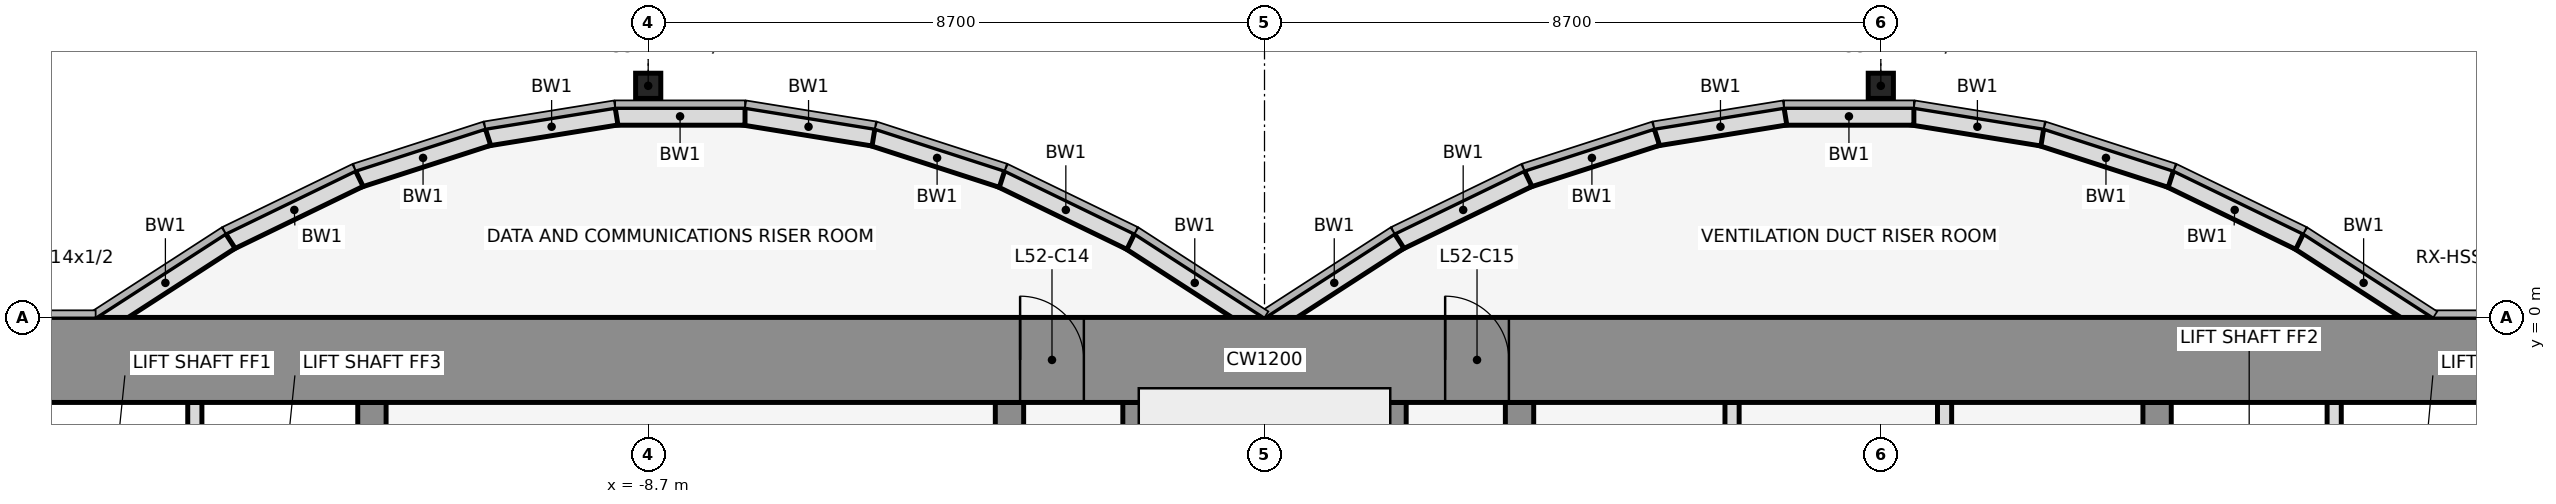
"""IFC4 building model, lengths in metres.
Left out: names, types, materials, properties, quantities, classifications, styles, units other than length and angle.
Written with IfcOpenShell. Run it as: python <this file> out.ifc"""

import sys

from ifc_helpers import new_model, si_unit, direction, frame, frame_2d, origin, origin_2d, place, context, subcontext, project, spatial, rectangle, hollow_rectangle, extrude, element, fill, save


model = new_model("IFC4")
c1 = context("Model", 3, precision=1e-05, world=origin(), true_north=direction((0.0, 1.0)))
c2 = subcontext(c1, "Body", "Model", "MODEL_VIEW")
j1 = project(units=[si_unit("LENGTHUNIT", "METRE"), si_unit("PLANEANGLEUNIT", "RADIAN")], contexts=[c1])
p1 = place(None, origin())
s1 = spatial("IfcSite", under=j1, at=p1, CompositionType="ELEMENT")
p2 = place(p1, origin())
s2 = spatial("IfcBuilding", under=s1, at=p2, CompositionType="ELEMENT")
p3 = place(p2, frame((0.0, 0.0, 231.9)))
s3 = spatial("IfcBuildingStorey", under=s2, at=p3, CompositionType="ELEMENT", Elevation=231.9)
for number, where, z_axis, x_axis in (
    (1, (-8.7, 3.269, 0.0), (0.0, 0.0, 1.0), (1.0, 0.0, 0.0)),
    (2, (8.7, 3.269, 0.0), (0.0, 0.0, 1.0), (1.0, 0.0, 0.0)),
):
    element("IfcColumn", number, at=place(p3, frame(where, z_axis=z_axis, x_axis=x_axis)), inside=s3, PredefinedType="COLUMN", context=c2, shape_type="SweptSolid", body=[
        extrude(hollow_rectangle(XDim=0.356, YDim=0.356, WallThickness=0.012, at=origin_2d()), origin(), (0.0, 0.0, 1.0), 4.1),
    ])
p4 = place(p3, frame((16.432, -0.105, 0.0), z_axis=(0.0, 0.0, 1.0), x_axis=(-0.83981312244, 0.542875602121, 0.0)))
e3 = element("IfcWall", 3, at=p4, inside=s3, PredefinedType="STANDARD", context=c2, shape_type="SweptSolid", body=[
    extrude(rectangle(XDim=2.183, YDim=0.25, at=frame_2d((1.091, 0.0))), origin(), (0.0, 0.0, 1.0), 3.9),
])
p5 = place(p3, frame((14.612, 1.073, 0.0), z_axis=(0.0, 0.0, 1.0), x_axis=(-0.89982408427, 0.436252928206, 0.0)))
e4 = element("IfcWall", 4, at=p5, inside=s3, PredefinedType="STANDARD", context=c2, shape_type="SweptSolid", body=[
    extrude(rectangle(XDim=2.038, YDim=0.25, at=frame_2d((1.019, 0.0))), origin(), (0.0, 0.0, 1.0), 3.9),
])
p6 = place(p3, frame((12.795, 1.955, 0.0), z_axis=(0.0, 0.0, 1.0), x_axis=(-0.951495806175, 0.307661714928, 0.0)))
e5 = element("IfcWall", 5, at=p6, inside=s3, PredefinedType="STANDARD", context=c2, shape_type="SweptSolid", body=[
    extrude(rectangle(XDim=1.927, YDim=0.25, at=frame_2d((0.963, 0.0))), origin(), (0.0, 0.0, 1.0), 3.9),
])
p7 = place(p3, frame((10.98, 2.543, 0.0), z_axis=(0.0, 0.0, 1.0), x_axis=(-0.987181718931, 0.159600293885, 0.0)))
e6 = element("IfcWall", 6, at=p7, inside=s3, PredefinedType="STANDARD", context=c2, shape_type="SweptSolid", body=[
    extrude(rectangle(XDim=1.857, YDim=0.25, at=frame_2d((0.929, 0.0))), origin(), (0.0, 0.0, 1.0), 3.9),
])
p8 = place(p3, frame((9.167, 2.838, 0.0), z_axis=(0.0, 0.0, 1.0), x_axis=(-1.0, 0.0, 0.0)))
e7 = element("IfcWall", 7, at=p8, inside=s3, PredefinedType="STANDARD", context=c2, shape_type="SweptSolid", body=[
    extrude(rectangle(XDim=1.833, YDim=0.25, at=frame_2d((0.917, 0.0))), origin(), (0.0, 0.0, 1.0), 3.9),
])
p9 = place(p3, frame((7.353, 2.84, 0.0), z_axis=(0.0, 0.0, 1.0), x_axis=(-0.987181718931, -0.159600293885, 0.0)))
e8 = element("IfcWall", 8, at=p9, inside=s3, PredefinedType="STANDARD", context=c2, shape_type="SweptSolid", body=[
    extrude(rectangle(XDim=1.857, YDim=0.25, at=frame_2d((0.929, 0.0))), origin(), (0.0, 0.0, 1.0), 3.9),
])
p10 = place(p3, frame((5.538, 2.548, 0.0), z_axis=(0.0, 0.0, 1.0), x_axis=(-0.951495806175, -0.307661714928, 0.0)))
e9 = element("IfcWall", 9, at=p10, inside=s3, PredefinedType="STANDARD", context=c2, shape_type="SweptSolid", body=[
    extrude(rectangle(XDim=1.927, YDim=0.25, at=frame_2d((0.963, 0.0))), origin(), (0.0, 0.0, 1.0), 3.9),
])
p11 = place(p3, frame((3.721, 1.962, 0.0), z_axis=(0.0, 0.0, 1.0), x_axis=(-0.89982408427, -0.436252928206, 0.0)))
e10 = element("IfcWall", 10, at=p11, inside=s3, PredefinedType="STANDARD", context=c2, shape_type="SweptSolid", body=[
    extrude(rectangle(XDim=2.038, YDim=0.25, at=frame_2d((1.019, 0.0))), origin(), (0.0, 0.0, 1.0), 3.9),
])
for number, where, z_axis, x_axis in (
    (11, (1.901, 1.08, 0.0), (0.0, 0.0, 1.0), (-0.84, -0.543, 0.0)),
    (12, (-0.068, -0.105, 0.0), (0.0, 0.0, 1.0), (-0.84, 0.543, 0.0)),
):
    element("IfcWall", number, at=place(p3, frame(where, z_axis=z_axis, x_axis=x_axis)), inside=s3, PredefinedType="STANDARD", context=c2, shape_type="SweptSolid", body=[
        extrude(rectangle(XDim=2.183, YDim=0.25, at=frame_2d((1.091, 0.0))), origin(), (0.0, 0.0, 1.0), 3.9),
    ])
p12 = place(p3, frame((-1.888, 1.073, 0.0), z_axis=(0.0, 0.0, 1.0), x_axis=(-0.89982408427, 0.436252928206, 0.0)))
e13 = element("IfcWall", 13, at=p12, inside=s3, PredefinedType="STANDARD", context=c2, shape_type="SweptSolid", body=[
    extrude(rectangle(XDim=2.038, YDim=0.25, at=frame_2d((1.019, 0.0))), origin(), (0.0, 0.0, 1.0), 3.9),
])
p13 = place(p3, frame((-3.705, 1.955, 0.0), z_axis=(0.0, 0.0, 1.0), x_axis=(-0.951495806175, 0.307661714928, 0.0)))
e14 = element("IfcWall", 14, at=p13, inside=s3, PredefinedType="STANDARD", context=c2, shape_type="SweptSolid", body=[
    extrude(rectangle(XDim=1.927, YDim=0.25, at=frame_2d((0.963, 0.0))), origin(), (0.0, 0.0, 1.0), 3.9),
])
p14 = place(p3, frame((-5.52, 2.543, 0.0), z_axis=(0.0, 0.0, 1.0), x_axis=(-0.987181718931, 0.159600293885, 0.0)))
e15 = element("IfcWall", 15, at=p14, inside=s3, PredefinedType="STANDARD", context=c2, shape_type="SweptSolid", body=[
    extrude(rectangle(XDim=1.857, YDim=0.25, at=frame_2d((0.929, 0.0))), origin(), (0.0, 0.0, 1.0), 3.9),
])
p15 = place(p3, frame((-7.333, 2.838, 0.0), z_axis=(0.0, 0.0, 1.0), x_axis=(-1.0, 0.0, 0.0)))
e16 = element("IfcWall", 16, at=p15, inside=s3, PredefinedType="STANDARD", context=c2, shape_type="SweptSolid", body=[
    extrude(rectangle(XDim=1.833, YDim=0.25, at=frame_2d((0.917, 0.0))), origin(), (0.0, 0.0, 1.0), 3.9),
])
p16 = place(p3, frame((-9.147, 2.84, 0.0), z_axis=(0.0, 0.0, 1.0), x_axis=(-0.987181718931, -0.159600293885, 0.0)))
e17 = element("IfcWall", 17, at=p16, inside=s3, PredefinedType="STANDARD", context=c2, shape_type="SweptSolid", body=[
    extrude(rectangle(XDim=1.857, YDim=0.25, at=frame_2d((0.929, 0.0))), origin(), (0.0, 0.0, 1.0), 3.9),
])
p17 = place(p3, frame((-10.962, 2.548, 0.0), z_axis=(0.0, 0.0, 1.0), x_axis=(-0.951495806175, -0.307661714928, 0.0)))
e18 = element("IfcWall", 18, at=p17, inside=s3, PredefinedType="STANDARD", context=c2, shape_type="SweptSolid", body=[
    extrude(rectangle(XDim=1.927, YDim=0.25, at=frame_2d((0.963, 0.0))), origin(), (0.0, 0.0, 1.0), 3.9),
])
p18 = place(p3, frame((-12.779, 1.962, 0.0), z_axis=(0.0, 0.0, 1.0), x_axis=(-0.89982408427, -0.436252928206, 0.0)))
e19 = element("IfcWall", 19, at=p18, inside=s3, PredefinedType="STANDARD", context=c2, shape_type="SweptSolid", body=[
    extrude(rectangle(XDim=2.038, YDim=0.25, at=frame_2d((1.019, 0.0))), origin(), (0.0, 0.0, 1.0), 3.9),
])
p19 = place(p3, frame((-14.599, 1.08, 0.0), z_axis=(0.0, 0.0, 1.0), x_axis=(-0.83981312244, -0.542875602121, 0.0)))
e20 = element("IfcWall", 20, at=p19, inside=s3, PredefinedType="STANDARD", context=c2, shape_type="SweptSolid", body=[
    extrude(rectangle(XDim=2.183, YDim=0.25, at=frame_2d((1.091, 0.0))), origin(), (0.0, 0.0, 1.0), 3.9),
])
p20 = place(p3, frame((-15.1, -4.6, 0.0), z_axis=(0.0, 0.0, 1.0), x_axis=(0.0, 1.0, 0.0)))
e21 = element("IfcWall", 21, at=p20, inside=s3, PredefinedType="PARTITIONING", context=c2, shape_type="SweptSolid", body=[
    extrude(rectangle(XDim=3.4, YDim=0.2, at=frame_2d((1.7, 0.0))), origin(), (0.0, 0.0, 1.0), 2.79),
])
p21 = place(p3, frame((-12.6, -11.8, 0.0), z_axis=(0.0, 0.0, 1.0), x_axis=(0.0, 1.0, 0.0)))
e22 = element("IfcWall", 22, at=p21, inside=s3, PredefinedType="SHEAR", context=c2, shape_type="SweptSolid", body=[
    extrude(rectangle(XDim=10.6, YDim=0.4, at=frame_2d((5.3, 0.0))), origin(), (0.0, 0.0, 1.0), 4.1),
])
p22 = place(p21, frame((4.75, 0.0, 0.0)))
e23 = element("IfcOpeningElement", 23, at=p22, cuts=e22, PredefinedType="OPENING", context=c2, shape_type="SweptSolid", body=[
    extrude(rectangle(XDim=1.1, YDim=2.1, at=frame_2d((0.55, 1.05))), frame((0.0, 0.212, 0.0), z_axis=(0.0, -1.0, 0.0), x_axis=(1.0, 0.0, 0.0)), (0.0, 0.0, 1.0), 0.424),
])
p23 = place(p3, frame((-3.6, -11.8, 0.0), z_axis=(0.0, 0.0, 1.0), x_axis=(0.0, 1.0, 0.0)))
e24 = element("IfcWall", 24, at=p23, inside=s3, PredefinedType="SHEAR", context=c2, shape_type="SweptSolid", body=[
    extrude(rectangle(XDim=10.6, YDim=0.4, at=frame_2d((5.3, 0.0))), origin(), (0.0, 0.0, 1.0), 4.1),
])
p24 = place(p23, frame((4.85, 0.0, 0.0)))
e25 = element("IfcOpeningElement", 25, at=p24, cuts=e24, PredefinedType="OPENING", context=c2, shape_type="SweptSolid", body=[
    extrude(rectangle(XDim=0.9, YDim=2.1, at=frame_2d((0.45, 1.05))), frame((0.0, 0.212, 0.0), z_axis=(0.0, -1.0, 0.0), x_axis=(1.0, 0.0, 0.0)), (0.0, 0.0, 1.0), 0.424),
])
for number, where, z_axis, x_axis in (
    (26, (-1.8, -11.8, 0.0), (0.0, 0.0, 1.0), (0.0, 1.0, 0.0)),
    (27, (1.8, -11.8, 0.0), (0.0, 0.0, 1.0), (0.0, 1.0, 0.0)),
):
    element("IfcWall", number, at=place(p3, frame(where, z_axis=z_axis, x_axis=x_axis)), inside=s3, PredefinedType="SHEAR", context=c2, shape_type="SweptSolid", body=[
        extrude(rectangle(XDim=10.6, YDim=0.4, at=frame_2d((5.3, 0.0))), origin(), (0.0, 0.0, 1.0), 4.1),
    ])
p25 = place(p3, frame((3.6, -11.8, 0.0), z_axis=(0.0, 0.0, 1.0), x_axis=(0.0, 1.0, 0.0)))
e28 = element("IfcWall", 28, at=p25, inside=s3, PredefinedType="SHEAR", context=c2, shape_type="SweptSolid", body=[
    extrude(rectangle(XDim=10.6, YDim=0.4, at=frame_2d((5.3, 0.0))), origin(), (0.0, 0.0, 1.0), 4.1),
])
p26 = place(p25, frame((1.35, 0.0, 0.0)))
e29 = element("IfcOpeningElement", 29, at=p26, cuts=e28, PredefinedType="OPENING", context=c2, shape_type="SweptSolid", body=[
    extrude(rectangle(XDim=0.9, YDim=2.1, at=frame_2d((0.45, 1.05))), frame((0.0, 0.212, 0.0), z_axis=(0.0, -1.0, 0.0), x_axis=(1.0, 0.0, 0.0)), (0.0, 0.0, 1.0), 0.424),
])
for number, where, z_axis, x_axis in (
    (30, (6.6, -4.6, 0.0), (0.0, 0.0, 1.0), (0.0, 1.0, 0.0)),
    (31, (9.6, -4.6, 0.0), (0.0, 0.0, 1.0), (0.0, 1.0, 0.0)),
):
    element("IfcWall", number, at=place(p3, frame(where, z_axis=z_axis, x_axis=x_axis)), inside=s3, PredefinedType="PARTITIONING", context=c2, shape_type="SweptSolid", body=[
        extrude(rectangle(XDim=3.4, YDim=0.2, at=frame_2d((1.7, 0.0))), origin(), (0.0, 0.0, 1.0), 2.79),
    ])
p27 = place(p3, frame((12.6, -11.8, 0.0), z_axis=(0.0, 0.0, 1.0), x_axis=(0.0, 1.0, 0.0)))
e32 = element("IfcWall", 32, at=p27, inside=s3, PredefinedType="SHEAR", context=c2, shape_type="SweptSolid", body=[
    extrude(rectangle(XDim=10.6, YDim=0.4, at=frame_2d((5.3, 0.0))), origin(), (0.0, 0.0, 1.0), 4.1),
])
p28 = place(p27, frame((1.25, 0.0, 0.0)))
e33 = element("IfcOpeningElement", 33, at=p28, cuts=e32, PredefinedType="OPENING", context=c2, shape_type="SweptSolid", body=[
    extrude(rectangle(XDim=1.2, YDim=2.1, at=frame_2d((0.6, 1.05))), frame((0.0, 0.212, 0.0), z_axis=(0.0, -1.0, 0.0), x_axis=(1.0, 0.0, 0.0)), (0.0, 0.0, 1.0), 0.424),
])
p29 = place(p27, frame((4.75, 0.0, 0.0)))
e34 = element("IfcOpeningElement", 34, at=p29, cuts=e32, PredefinedType="OPENING", context=c2, shape_type="SweptSolid", body=[
    extrude(rectangle(XDim=1.1, YDim=2.1, at=frame_2d((0.55, 1.05))), frame((0.0, 0.212, 0.0), z_axis=(0.0, -1.0, 0.0), x_axis=(1.0, 0.0, 0.0)), (0.0, 0.0, 1.0), 0.424),
])
p30 = place(p3, frame((15.1, -4.6, 0.0), z_axis=(0.0, 0.0, 1.0), x_axis=(0.0, 1.0, 0.0)))
e35 = element("IfcWall", 35, at=p30, inside=s3, PredefinedType="PARTITIONING", context=c2, shape_type="SweptSolid", body=[
    extrude(rectangle(XDim=3.4, YDim=0.2, at=frame_2d((1.7, 0.0))), origin(), (0.0, 0.0, 1.0), 2.79),
])
p31 = place(p3, frame((-22.0, -0.6, 0.0), z_axis=(0.0, 0.0, 1.0), x_axis=(1.0, 0.0, 0.0)))
e36 = element("IfcWall", 36, at=p31, inside=s3, PredefinedType="SHEAR", context=c2, shape_type="SweptSolid", body=[
    extrude(rectangle(XDim=44.0, YDim=1.2, at=frame_2d((22.0, 0.0))), origin(), (0.0, 0.0, 1.0), 4.1),
])
p32 = place(p31, frame((18.55, 0.0, 0.0)))
e37 = element("IfcOpeningElement", 37, at=p32, cuts=e36, PredefinedType="OPENING", context=c2, shape_type="SweptSolid", body=[
    extrude(rectangle(XDim=0.9, YDim=2.1, at=frame_2d((0.45, 1.05))), frame((0.0, 0.612, 0.0), z_axis=(0.0, -1.0, 0.0), x_axis=(1.0, 0.0, 0.0)), (0.0, 0.0, 1.0), 1.224),
])
p33 = place(p31, frame((24.55, 0.0, 0.0)))
e38 = element("IfcOpeningElement", 38, at=p33, cuts=e36, PredefinedType="OPENING", context=c2, shape_type="SweptSolid", body=[
    extrude(rectangle(XDim=0.9, YDim=2.1, at=frame_2d((0.45, 1.05))), frame((0.0, 0.612, 0.0), z_axis=(0.0, -1.0, 0.0), x_axis=(1.0, 0.0, 0.0)), (0.0, 0.0, 1.0), 1.224),
])
p34 = place(p32, origin())
e39 = element("IfcDoor", 39, at=p34, inside=s3, OperationType="SINGLE_SWING_LEFT", PredefinedType="DOOR", context=c2, shape_type="SweptSolid", body=[
    extrude(rectangle(XDim=0.9, YDim=2.1, at=frame_2d((0.45, 1.05))), frame((0.0, 0.025, 0.0), z_axis=(0.0, -1.0, 0.0), x_axis=(1.0, 0.0, 0.0)), (0.0, 0.0, 1.0), 0.05),
])
fill(e37, e39)
p35 = place(p33, origin())
e40 = element("IfcDoor", 40, at=p35, inside=s3, OperationType="SINGLE_SWING_LEFT", PredefinedType="DOOR", context=c2, shape_type="SweptSolid", body=[
    extrude(rectangle(XDim=0.9, YDim=2.1, at=frame_2d((0.45, 1.05))), frame((0.0, 0.025, 0.0), z_axis=(0.0, -1.0, 0.0), x_axis=(1.0, 0.0, 0.0)), (0.0, 0.0, 1.0), 0.05),
])
fill(e38, e40)
save(model, sys.argv[1])
